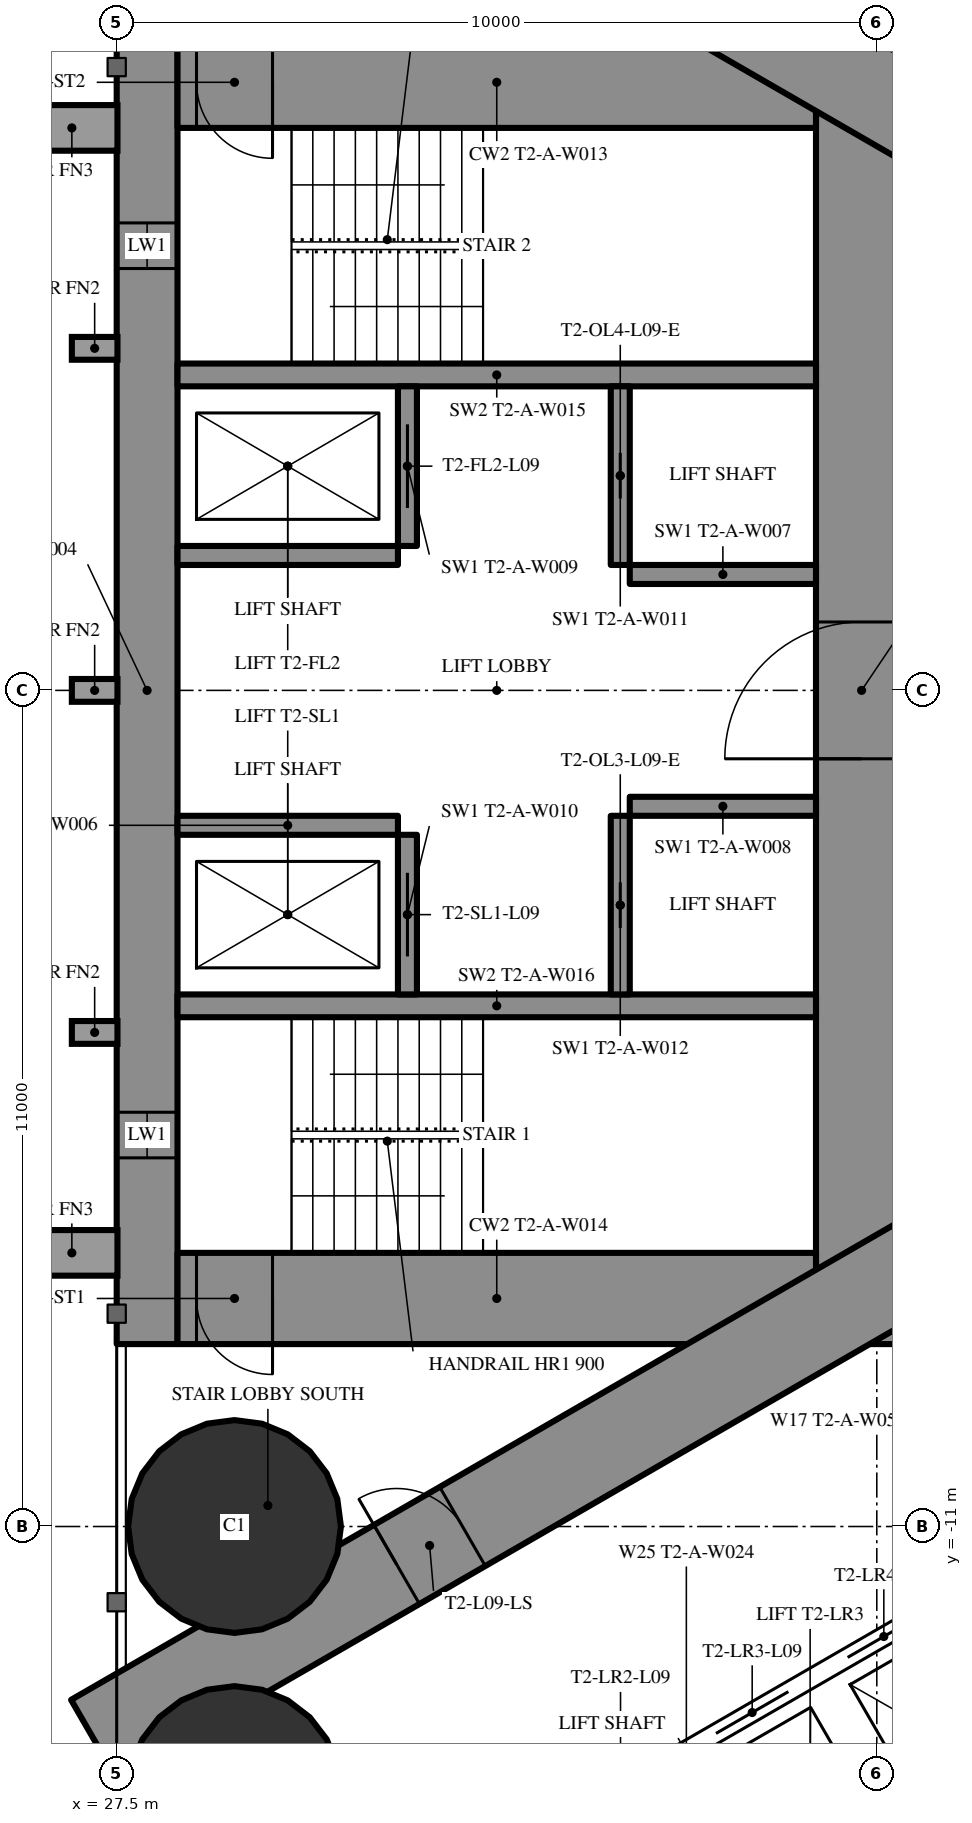
"""IFC4 building model, lengths in metres.
Left out: names, types, materials, properties, quantities, classifications, styles, units other than length and angle.
Written with IfcOpenShell. Run it as: python <this file> out.ifc"""

import sys

from ifc_helpers import new_model, si_unit, direction, frame, frame_2d, origin, origin_2d, place, context, subcontext, project, spatial, rectangle, hollow_circle, extrude, element, fill, save


model = new_model("IFC4")
c1 = context("Model", 3, precision=1e-05, world=origin(), true_north=direction((0.0, 1.0)))
c2 = subcontext(c1, "Body", "Model", "MODEL_VIEW")
j1 = project(units=[si_unit("LENGTHUNIT", "METRE"), si_unit("PLANEANGLEUNIT", "RADIAN")], contexts=[c1])
p1 = place(None, origin())
s1 = spatial("IfcSite", under=j1, at=p1, CompositionType="ELEMENT")
p2 = place(p1, origin())
s2 = spatial("IfcBuilding", under=s1, at=p2, CompositionType="ELEMENT")
p3 = place(p2, frame((0.0, 0.0, 39.0)))
s3 = spatial("IfcBuildingStorey", under=s2, at=p3, CompositionType="ELEMENT", Elevation=39.0)
for number, where, z_axis, x_axis in (
    (1, (29.05, -11.0, 0.0), (0.0, 0.0, 1.0), (1.0, 0.0, 0.0)),
    (2, (29.05, -14.5, 0.0), (0.0, 0.0, 1.0), (1.0, 0.0, 0.0)),
):
    element("IfcColumn", number, at=place(p3, frame(where, z_axis=z_axis, x_axis=x_axis)), inside=s3, PredefinedType="COLUMN", context=c2, shape_type="SweptSolid", body=[
        extrude(hollow_circle(Radius=1.4, WallThickness=0.12, at=origin_2d()), origin(), (0.0, 0.0, 1.0), 3.5),
    ])
p4 = place(p3, frame((27.9, -8.6, 0.0), z_axis=(0.0, 0.0, 1.0), x_axis=(0.0, 1.0, 0.0)))
e3 = element("IfcWall", 3, at=p4, inside=s3, PredefinedType="SHEAR", context=c2, shape_type="SweptSolid", body=[
    extrude(rectangle(XDim=17.2, YDim=0.8, at=frame_2d((8.6, 0.0))), origin(), (0.0, 0.0, 1.0), 3.5),
])
p5 = place(p4, frame((2.45, 0.0, 0.6)))
e4 = element("IfcOpeningElement", 4, at=p5, cuts=e3, PredefinedType="OPENING", context=c2, shape_type="SweptSolid", body=[
    extrude(rectangle(XDim=0.6, YDim=2.1, at=frame_2d((0.3, 1.05))), frame((0.0, 0.41, 0.0), z_axis=(0.0, -1.0, 0.0), x_axis=(1.0, 0.0, 0.0)), (0.0, 0.0, 1.0), 0.82),
])
p6 = place(p4, frame((14.15, 0.0, 0.6)))
e5 = element("IfcOpeningElement", 5, at=p6, cuts=e3, PredefinedType="OPENING", context=c2, shape_type="SweptSolid", body=[
    extrude(rectangle(XDim=0.6, YDim=2.1, at=frame_2d((0.3, 1.05))), frame((0.0, 0.41, 0.0), z_axis=(0.0, -1.0, 0.0), x_axis=(1.0, 0.0, 0.0)), (0.0, 0.0, 1.0), 0.82),
])
p7 = place(p3, frame((37.3, -8.6, 0.0), z_axis=(0.0, 0.0, 1.0), x_axis=(0.0, 1.0, 0.0)))
e6 = element("IfcWall", 6, at=p7, inside=s3, PredefinedType="SHEAR", context=c2, shape_type="SweptSolid", body=[
    extrude(rectangle(XDim=17.2, YDim=1.2, at=frame_2d((8.6, 0.0))), origin(), (0.0, 0.0, 1.0), 3.5),
])
p8 = place(p7, frame((7.7, 0.0, 0.0)))
e7 = element("IfcOpeningElement", 7, at=p8, cuts=e6, PredefinedType="OPENING", context=c2, shape_type="SweptSolid", body=[
    extrude(rectangle(XDim=1.8, YDim=2.2, at=frame_2d((0.9, 1.1))), frame((0.0, 0.61, 0.0), z_axis=(0.0, -1.0, 0.0), x_axis=(1.0, 0.0, 0.0)), (0.0, 0.0, 1.0), 1.22),
])
p9 = place(p3, frame((28.3, -8.0, 0.0), z_axis=(0.0, 0.0, 1.0), x_axis=(1.0, 0.0, 0.0)))
e8 = element("IfcWall", 8, at=p9, inside=s3, PredefinedType="SHEAR", context=c2, shape_type="SweptSolid", body=[
    extrude(rectangle(XDim=8.4, YDim=1.2, at=frame_2d((4.2, 0.0))), origin(), (0.0, 0.0, 1.0), 3.5),
])
p10 = place(p9, frame((0.25, 0.0, 0.0)))
e9 = element("IfcOpeningElement", 9, at=p10, cuts=e8, PredefinedType="OPENING", context=c2, shape_type="SweptSolid", body=[
    extrude(rectangle(XDim=1.0, YDim=2.2, at=frame_2d((0.5, 1.1))), frame((0.0, 0.61, 0.0), z_axis=(0.0, -1.0, 0.0), x_axis=(1.0, 0.0, 0.0)), (0.0, 0.0, 1.0), 1.22),
])
p11 = place(p3, frame((28.3, 8.0, 0.0), z_axis=(0.0, 0.0, 1.0), x_axis=(1.0, 0.0, 0.0)))
e10 = element("IfcWall", 10, at=p11, inside=s3, PredefinedType="SHEAR", context=c2, shape_type="SweptSolid", body=[
    extrude(rectangle(XDim=8.4, YDim=1.2, at=frame_2d((4.2, 0.0))), origin(), (0.0, 0.0, 1.0), 3.5),
])
p12 = place(p11, frame((0.25, 0.0, 0.0)))
e11 = element("IfcOpeningElement", 11, at=p12, cuts=e10, PredefinedType="OPENING", context=c2, shape_type="SweptSolid", body=[
    extrude(rectangle(XDim=1.0, YDim=2.2, at=frame_2d((0.5, 1.1))), frame((0.0, 0.61, 0.0), z_axis=(0.0, -1.0, 0.0), x_axis=(1.0, 0.0, 0.0)), (0.0, 0.0, 1.0), 1.22),
])
for number, where, z_axis, x_axis in (
    (12, (28.3, -4.15, 0.0), (0.0, 0.0, 1.0), (1.0, 0.0, 0.0)),
    (13, (28.3, 4.15, 0.0), (0.0, 0.0, 1.0), (1.0, 0.0, 0.0)),
):
    element("IfcWall", number, at=place(p3, frame(where, z_axis=z_axis, x_axis=x_axis)), inside=s3, PredefinedType="SHEAR", context=c2, shape_type="SweptSolid", body=[
        extrude(rectangle(XDim=8.4, YDim=0.3, at=frame_2d((4.2, 0.0))), origin(), (0.0, 0.0, 1.0), 3.5),
    ])
p13 = place(p3, frame((31.325, -4.0, 0.0), z_axis=(0.0, 0.0, 1.0), x_axis=(0.0, 1.0, 0.0)))
e14 = element("IfcWall", 14, at=p13, inside=s3, PredefinedType="SHEAR", context=c2, shape_type="SweptSolid", body=[
    extrude(rectangle(XDim=2.1, YDim=0.25, at=frame_2d((1.05, 0.0))), origin(), (0.0, 0.0, 1.0), 3.5),
])
p14 = place(p13, frame((0.5, 0.0, 0.0)))
e15 = element("IfcOpeningElement", 15, at=p14, cuts=e14, PredefinedType="OPENING", context=c2, shape_type="SweptSolid", body=[
    extrude(rectangle(XDim=1.1, YDim=2.2, at=frame_2d((0.55, 1.1))), frame((0.0, 0.135, 0.0), z_axis=(0.0, -1.0, 0.0), x_axis=(1.0, 0.0, 0.0)), (0.0, 0.0, 1.0), 0.27),
])
p15 = place(p3, frame((34.125, -4.0, 0.0), z_axis=(0.0, 0.0, 1.0), x_axis=(0.0, 1.0, 0.0)))
e16 = element("IfcWall", 16, at=p15, inside=s3, PredefinedType="SHEAR", context=c2, shape_type="SweptSolid", body=[
    extrude(rectangle(XDim=2.35, YDim=0.25, at=frame_2d((1.175, 0.0))), origin(), (0.0, 0.0, 1.0), 3.5),
])
p16 = place(p15, frame((0.875, 0.0, 0.0)))
e17 = element("IfcOpeningElement", 17, at=p16, cuts=e16, PredefinedType="OPENING", context=c2, shape_type="SweptSolid", body=[
    extrude(rectangle(XDim=0.6, YDim=2.0, at=frame_2d((0.3, 1.0))), frame((0.0, 0.135, 0.0), z_axis=(0.0, -1.0, 0.0), x_axis=(1.0, 0.0, 0.0)), (0.0, 0.0, 1.0), 0.27),
])
p17 = place(p3, frame((28.3, -1.775, 0.0), z_axis=(0.0, 0.0, 1.0), x_axis=(1.0, 0.0, 0.0)))
e18 = element("IfcWall", 18, at=p17, inside=s3, PredefinedType="SHEAR", context=c2, shape_type="SweptSolid", body=[
    extrude(rectangle(XDim=2.9, YDim=0.25, at=frame_2d((1.45, 0.0))), origin(), (0.0, 0.0, 1.0), 3.5),
])
p18 = place(p3, frame((34.25, -1.525, 0.0), z_axis=(0.0, 0.0, 1.0), x_axis=(1.0, 0.0, 0.0)))
e19 = element("IfcWall", 19, at=p18, inside=s3, PredefinedType="SHEAR", context=c2, shape_type="SweptSolid", body=[
    extrude(rectangle(XDim=2.45, YDim=0.25, at=frame_2d((1.225, 0.0))), origin(), (0.0, 0.0, 1.0), 3.5),
])
p19 = place(p3, frame((31.325, 1.9, 0.0), z_axis=(0.0, 0.0, 1.0), x_axis=(0.0, 1.0, 0.0)))
e20 = element("IfcWall", 20, at=p19, inside=s3, PredefinedType="SHEAR", context=c2, shape_type="SweptSolid", body=[
    extrude(rectangle(XDim=2.1, YDim=0.25, at=frame_2d((1.05, 0.0))), origin(), (0.0, 0.0, 1.0), 3.5),
])
p20 = place(p19, frame((0.5, 0.0, 0.0)))
e21 = element("IfcOpeningElement", 21, at=p20, cuts=e20, PredefinedType="OPENING", context=c2, shape_type="SweptSolid", body=[
    extrude(rectangle(XDim=1.1, YDim=2.2, at=frame_2d((0.55, 1.1))), frame((0.0, 0.135, 0.0), z_axis=(0.0, -1.0, 0.0), x_axis=(1.0, 0.0, 0.0)), (0.0, 0.0, 1.0), 0.27),
])
p21 = place(p3, frame((34.125, 1.65, 0.0), z_axis=(0.0, 0.0, 1.0), x_axis=(0.0, 1.0, 0.0)))
e22 = element("IfcWall", 22, at=p21, inside=s3, PredefinedType="SHEAR", context=c2, shape_type="SweptSolid", body=[
    extrude(rectangle(XDim=2.35, YDim=0.25, at=frame_2d((1.175, 0.0))), origin(), (0.0, 0.0, 1.0), 3.5),
])
p22 = place(p21, frame((0.875, 0.0, 0.0)))
e23 = element("IfcOpeningElement", 23, at=p22, cuts=e22, PredefinedType="OPENING", context=c2, shape_type="SweptSolid", body=[
    extrude(rectangle(XDim=0.6, YDim=2.0, at=frame_2d((0.3, 1.0))), frame((0.0, 0.135, 0.0), z_axis=(0.0, -1.0, 0.0), x_axis=(1.0, 0.0, 0.0)), (0.0, 0.0, 1.0), 0.27),
])
p23 = place(p3, frame((28.3, 1.775, 0.0), z_axis=(0.0, 0.0, 1.0), x_axis=(1.0, 0.0, 0.0)))
e24 = element("IfcWall", 24, at=p23, inside=s3, PredefinedType="SHEAR", context=c2, shape_type="SweptSolid", body=[
    extrude(rectangle(XDim=2.9, YDim=0.25, at=frame_2d((1.45, 0.0))), origin(), (0.0, 0.0, 1.0), 3.5),
])
p24 = place(p3, frame((34.25, 1.525, 0.0), z_axis=(0.0, 0.0, 1.0), x_axis=(1.0, 0.0, 0.0)))
e25 = element("IfcWall", 25, at=p24, inside=s3, PredefinedType="SHEAR", context=c2, shape_type="SweptSolid", body=[
    extrude(rectangle(XDim=2.45, YDim=0.25, at=frame_2d((1.225, 0.0))), origin(), (0.0, 0.0, 1.0), 3.5),
])
p25 = place(p3, frame((27.2, -13.8, 0.0), z_axis=(0.0, 0.0, 1.0), x_axis=(0.866027159892, 0.499996958321, 0.0)))
e26 = element("IfcWall", 26, at=p25, inside=s3, PredefinedType="SHEAR", context=c2, shape_type="SweptSolid", body=[
    extrude(rectangle(XDim=27.947, YDim=1.2, at=frame_2d((13.973, 0.0))), origin(), (0.0, 0.0, 1.0), 3.5),
])
p26 = place(p25, frame((4.6, 0.0, 0.0)))
e27 = element("IfcOpeningElement", 27, at=p26, cuts=e26, PredefinedType="OPENING", context=c2, shape_type="SweptSolid", body=[
    extrude(rectangle(XDim=1.0, YDim=2.2, at=frame_2d((0.5, 1.1))), frame((0.0, 0.61, 0.0), z_axis=(0.0, -1.0, 0.0), x_axis=(1.0, 0.0, 0.0)), (0.0, 0.0, 1.0), 1.22),
])
p27 = place(p25, frame((13.395, 0.0, 0.0)))
e28 = element("IfcOpeningElement", 28, at=p27, cuts=e26, PredefinedType="OPENING", context=c2, shape_type="SweptSolid", body=[
    extrude(rectangle(XDim=1.8, YDim=2.2, at=frame_2d((0.9, 1.1))), frame((0.0, 0.61, 0.0), z_axis=(0.0, -1.0, 0.0), x_axis=(1.0, 0.0, 0.0)), (0.0, 0.0, 1.0), 1.22),
])
p28 = place(p3, frame((27.2, 13.8, 0.0), z_axis=(0.0, 0.0, 1.0), x_axis=(0.866024515034, -0.500001539357, 0.0)))
e29 = element("IfcWall", 29, at=p28, inside=s3, PredefinedType="SHEAR", context=c2, shape_type="SweptSolid", body=[
    extrude(rectangle(XDim=26.907, YDim=1.2, at=frame_2d((13.454, 0.0))), origin(), (0.0, 0.0, 1.0), 3.5),
])
p29 = place(p28, frame((4.6, 0.0, 0.0)))
e30 = element("IfcOpeningElement", 30, at=p29, cuts=e29, PredefinedType="OPENING", context=c2, shape_type="SweptSolid", body=[
    extrude(rectangle(XDim=1.0, YDim=2.2, at=frame_2d((0.5, 1.1))), frame((0.0, 0.61, 0.0), z_axis=(0.0, -1.0, 0.0), x_axis=(1.0, 0.0, 0.0)), (0.0, 0.0, 1.0), 1.22),
])
p30 = place(p28, frame((13.395, 0.0, 0.0)))
e31 = element("IfcOpeningElement", 31, at=p30, cuts=e29, PredefinedType="OPENING", context=c2, shape_type="SweptSolid", body=[
    extrude(rectangle(XDim=1.8, YDim=2.2, at=frame_2d((0.9, 1.1))), frame((0.0, 0.61, 0.0), z_axis=(0.0, -1.0, 0.0), x_axis=(1.0, 0.0, 0.0)), (0.0, 0.0, 1.0), 1.22),
])
p31 = place(p3, frame((36.834, 10.894, 0.0), z_axis=(0.0, 0.0, 1.0), x_axis=(0.866028157229, -0.499995230863, 0.0)))
e32 = element("IfcWall", 32, at=p31, inside=s3, PredefinedType="PARTITIONING", context=c2, shape_type="SweptSolid", body=[
    extrude(rectangle(XDim=21.667, YDim=0.2, at=frame_2d((10.833, 0.0))), origin(), (0.0, 0.0, 1.0), 3.25),
])
p32 = place(p31, frame((18.885, 0.0, 0.0)))
e33 = element("IfcOpeningElement", 33, at=p32, cuts=e32, PredefinedType="OPENING", context=c2, shape_type="SweptSolid", body=[
    extrude(rectangle(XDim=0.95, YDim=2.2, at=frame_2d((0.475, 1.1))), frame((0.0, 0.11, 0.0), z_axis=(0.0, -1.0, 0.0), x_axis=(1.0, 0.0, 0.0)), (0.0, 0.0, 1.0), 0.22),
])
p33 = place(p31, frame((10.212, 0.0, 0.0)))
e34 = element("IfcOpeningElement", 34, at=p33, cuts=e32, PredefinedType="OPENING", context=c2, shape_type="SweptSolid", body=[
    extrude(rectangle(XDim=0.95, YDim=2.2, at=frame_2d((0.475, 1.1))), frame((0.0, 0.11, 0.0), z_axis=(0.0, -1.0, 0.0), x_axis=(1.0, 0.0, 0.0)), (0.0, 0.0, 1.0), 0.22),
])
p34 = place(p31, frame((8.225, 0.0, 0.0)))
e35 = element("IfcOpeningElement", 35, at=p34, cuts=e32, PredefinedType="OPENING", context=c2, shape_type="SweptSolid", body=[
    extrude(rectangle(XDim=0.95, YDim=2.2, at=frame_2d((0.475, 1.1))), frame((0.0, 0.11, 0.0), z_axis=(0.0, -1.0, 0.0), x_axis=(1.0, 0.0, 0.0)), (0.0, 0.0, 1.0), 0.22),
])
p35 = place(p31, frame((1.825, 0.0, 0.0)))
e36 = element("IfcOpeningElement", 36, at=p35, cuts=e32, PredefinedType="OPENING", context=c2, shape_type="SweptSolid", body=[
    extrude(rectangle(XDim=0.95, YDim=2.2, at=frame_2d((0.475, 1.1))), frame((0.0, 0.11, 0.0), z_axis=(0.0, -1.0, 0.0), x_axis=(1.0, 0.0, 0.0)), (0.0, 0.0, 1.0), 0.22),
])
p36 = place(p31, frame((0.246, 0.0, 0.0)))
e37 = element("IfcOpeningElement", 37, at=p36, cuts=e32, PredefinedType="OPENING", context=c2, shape_type="SweptSolid", body=[
    extrude(rectangle(XDim=0.9, YDim=2.2, at=frame_2d((0.45, 1.1))), frame((0.0, 0.11, 0.0), z_axis=(0.0, -1.0, 0.0), x_axis=(1.0, 0.0, 0.0)), (0.0, 0.0, 1.0), 0.22),
])
p37 = place(p3, frame((31.271, -16.097, 0.0), z_axis=(0.0, 0.0, 1.0), x_axis=(0.86604045752, 0.499973925258, 0.0)))
e38 = element("IfcWall", 38, at=p37, inside=s3, PredefinedType="PARTITIONING", context=c2, shape_type="SweptSolid", body=[
    extrude(rectangle(XDim=8.6, YDim=0.25, at=frame_2d((4.3, 0.0))), origin(), (0.0, 0.0, 1.0), 3.25),
])
p38 = place(p37, frame((0.75, 0.0, 0.0)))
e39 = element("IfcOpeningElement", 39, at=p38, cuts=e38, PredefinedType="OPENING", context=c2, shape_type="SweptSolid", body=[
    extrude(rectangle(XDim=1.1, YDim=2.2, at=frame_2d((0.55, 1.1))), frame((0.0, 0.135, 0.0), z_axis=(0.0, -1.0, 0.0), x_axis=(1.0, 0.0, 0.0)), (0.0, 0.0, 1.0), 0.27),
])
p39 = place(p37, frame((2.75, 0.0, 0.0)))
e40 = element("IfcOpeningElement", 40, at=p39, cuts=e38, PredefinedType="OPENING", context=c2, shape_type="SweptSolid", body=[
    extrude(rectangle(XDim=1.1, YDim=2.2, at=frame_2d((0.55, 1.1))), frame((0.0, 0.135, 0.0), z_axis=(0.0, -1.0, 0.0), x_axis=(1.0, 0.0, 0.0)), (0.0, 0.0, 1.0), 0.27),
])
p40 = place(p37, frame((4.75, 0.0, 0.0)))
e41 = element("IfcOpeningElement", 41, at=p40, cuts=e38, PredefinedType="OPENING", context=c2, shape_type="SweptSolid", body=[
    extrude(rectangle(XDim=1.1, YDim=2.2, at=frame_2d((0.55, 1.1))), frame((0.0, 0.135, 0.0), z_axis=(0.0, -1.0, 0.0), x_axis=(1.0, 0.0, 0.0)), (0.0, 0.0, 1.0), 0.27),
])
p41 = place(p37, frame((6.75, 0.0, 0.0)))
e42 = element("IfcOpeningElement", 42, at=p41, cuts=e38, PredefinedType="OPENING", context=c2, shape_type="SweptSolid", body=[
    extrude(rectangle(XDim=1.1, YDim=2.2, at=frame_2d((0.55, 1.1))), frame((0.0, 0.135, 0.0), z_axis=(0.0, -1.0, 0.0), x_axis=(1.0, 0.0, 0.0)), (0.0, 0.0, 1.0), 0.27),
])
p42 = place(p26, origin())
e43 = element("IfcDoor", 43, at=p42, inside=s3, OperationType="SINGLE_SWING_LEFT", PredefinedType="DOOR", context=c2, shape_type="SweptSolid", body=[
    extrude(rectangle(XDim=1.0, YDim=2.2, at=frame_2d((0.5, 1.1))), frame((0.0, 0.025, 0.0), z_axis=(0.0, -1.0, 0.0), x_axis=(1.0, 0.0, 0.0)), (0.0, 0.0, 1.0), 0.05),
])
fill(e27, e43)
p43 = place(p8, origin())
e44 = element("IfcDoor", 44, at=p43, inside=s3, OperationType="DOUBLE_DOOR_SINGLE_SWING", PredefinedType="DOOR", context=c2, shape_type="SweptSolid", body=[
    extrude(rectangle(XDim=1.8, YDim=2.2, at=frame_2d((0.9, 1.1))), frame((0.0, 0.025, 0.0), z_axis=(0.0, -1.0, 0.0), x_axis=(1.0, 0.0, 0.0)), (0.0, 0.0, 1.0), 0.05),
])
fill(e7, e44)
p44 = place(p10, origin())
e45 = element("IfcDoor", 45, at=p44, inside=s3, OperationType="SINGLE_SWING_RIGHT", PredefinedType="DOOR", context=c2, shape_type="SweptSolid", body=[
    extrude(rectangle(XDim=1.0, YDim=2.2, at=frame_2d((0.5, 1.1))), frame((0.0, 0.025, 0.0), z_axis=(0.0, -1.0, 0.0), x_axis=(1.0, 0.0, 0.0)), (0.0, 0.0, 1.0), 0.05),
])
fill(e9, e45)
p45 = place(p12, origin())
e46 = element("IfcDoor", 46, at=p45, inside=s3, OperationType="SINGLE_SWING_RIGHT", PredefinedType="DOOR", context=c2, shape_type="SweptSolid", body=[
    extrude(rectangle(XDim=1.0, YDim=2.2, at=frame_2d((0.5, 1.1))), frame((0.0, 0.025, 0.0), z_axis=(0.0, -1.0, 0.0), x_axis=(1.0, 0.0, 0.0)), (0.0, 0.0, 1.0), 0.05),
])
fill(e11, e46)
p46 = place(p14, origin())
e47 = element("IfcDoor", 47, at=p46, inside=s3, OperationType="SLIDING_TO_LEFT", PredefinedType="USERDEFINED", context=c2, shape_type="SweptSolid", body=[
    extrude(rectangle(XDim=1.1, YDim=2.2, at=frame_2d((0.55, 1.1))), frame((0.0, 0.025, 0.0), z_axis=(0.0, -1.0, 0.0), x_axis=(1.0, 0.0, 0.0)), (0.0, 0.0, 1.0), 0.05),
])
fill(e15, e47)
p47 = place(p20, origin())
e48 = element("IfcDoor", 48, at=p47, inside=s3, OperationType="SLIDING_TO_LEFT", PredefinedType="USERDEFINED", context=c2, shape_type="SweptSolid", body=[
    extrude(rectangle(XDim=1.1, YDim=2.2, at=frame_2d((0.55, 1.1))), frame((0.0, 0.025, 0.0), z_axis=(0.0, -1.0, 0.0), x_axis=(1.0, 0.0, 0.0)), (0.0, 0.0, 1.0), 0.05),
])
fill(e21, e48)
p48 = place(p16, origin())
e49 = element("IfcDoor", 49, at=p48, inside=s3, OperationType="SLIDING_TO_LEFT", PredefinedType="DOOR", context=c2, shape_type="SweptSolid", body=[
    extrude(rectangle(XDim=0.6, YDim=2.0, at=frame_2d((0.3, 1.0))), frame((0.0, 0.025, 0.0), z_axis=(0.0, -1.0, 0.0), x_axis=(1.0, 0.0, 0.0)), (0.0, 0.0, 1.0), 0.05),
])
fill(e17, e49)
p49 = place(p22, origin())
e50 = element("IfcDoor", 50, at=p49, inside=s3, OperationType="SLIDING_TO_LEFT", PredefinedType="DOOR", context=c2, shape_type="SweptSolid", body=[
    extrude(rectangle(XDim=0.6, YDim=2.0, at=frame_2d((0.3, 1.0))), frame((0.0, 0.025, 0.0), z_axis=(0.0, -1.0, 0.0), x_axis=(1.0, 0.0, 0.0)), (0.0, 0.0, 1.0), 0.05),
])
fill(e23, e50)
p50 = place(p40, origin())
e51 = element("IfcDoor", 51, at=p50, inside=s3, OperationType="DOUBLE_DOOR_SLIDING", PredefinedType="USERDEFINED", context=c2, shape_type="SweptSolid", body=[
    extrude(rectangle(XDim=1.1, YDim=2.2, at=frame_2d((0.55, 1.1))), frame((0.0, 0.025, 0.0), z_axis=(0.0, -1.0, 0.0), x_axis=(1.0, 0.0, 0.0)), (0.0, 0.0, 1.0), 0.05),
])
fill(e41, e51)
p51 = place(p41, origin())
e52 = element("IfcDoor", 52, at=p51, inside=s3, OperationType="DOUBLE_DOOR_SLIDING", PredefinedType="USERDEFINED", context=c2, shape_type="SweptSolid", body=[
    extrude(rectangle(XDim=1.1, YDim=2.2, at=frame_2d((0.55, 1.1))), frame((0.0, 0.025, 0.0), z_axis=(0.0, -1.0, 0.0), x_axis=(1.0, 0.0, 0.0)), (0.0, 0.0, 1.0), 0.05),
])
fill(e42, e52)
p52 = place(p5, origin())
e53 = element("IfcWindow", 53, at=p52, inside=s3, PartitioningType="SINGLE_PANEL", PredefinedType="WINDOW", context=c2, shape_type="SweptSolid", body=[
    extrude(rectangle(XDim=0.6, YDim=2.1, at=frame_2d((0.3, 1.05))), frame((0.0, 0.03, 0.0), z_axis=(0.0, -1.0, 0.0), x_axis=(1.0, 0.0, 0.0)), (0.0, 0.0, 1.0), 0.06),
])
fill(e4, e53)
p53 = place(p6, origin())
e54 = element("IfcWindow", 54, at=p53, inside=s3, PartitioningType="SINGLE_PANEL", PredefinedType="WINDOW", context=c2, shape_type="SweptSolid", body=[
    extrude(rectangle(XDim=0.6, YDim=2.1, at=frame_2d((0.3, 1.05))), frame((0.0, 0.03, 0.0), z_axis=(0.0, -1.0, 0.0), x_axis=(1.0, 0.0, 0.0)), (0.0, 0.0, 1.0), 0.06),
])
fill(e5, e54)
save(model, sys.argv[1])
